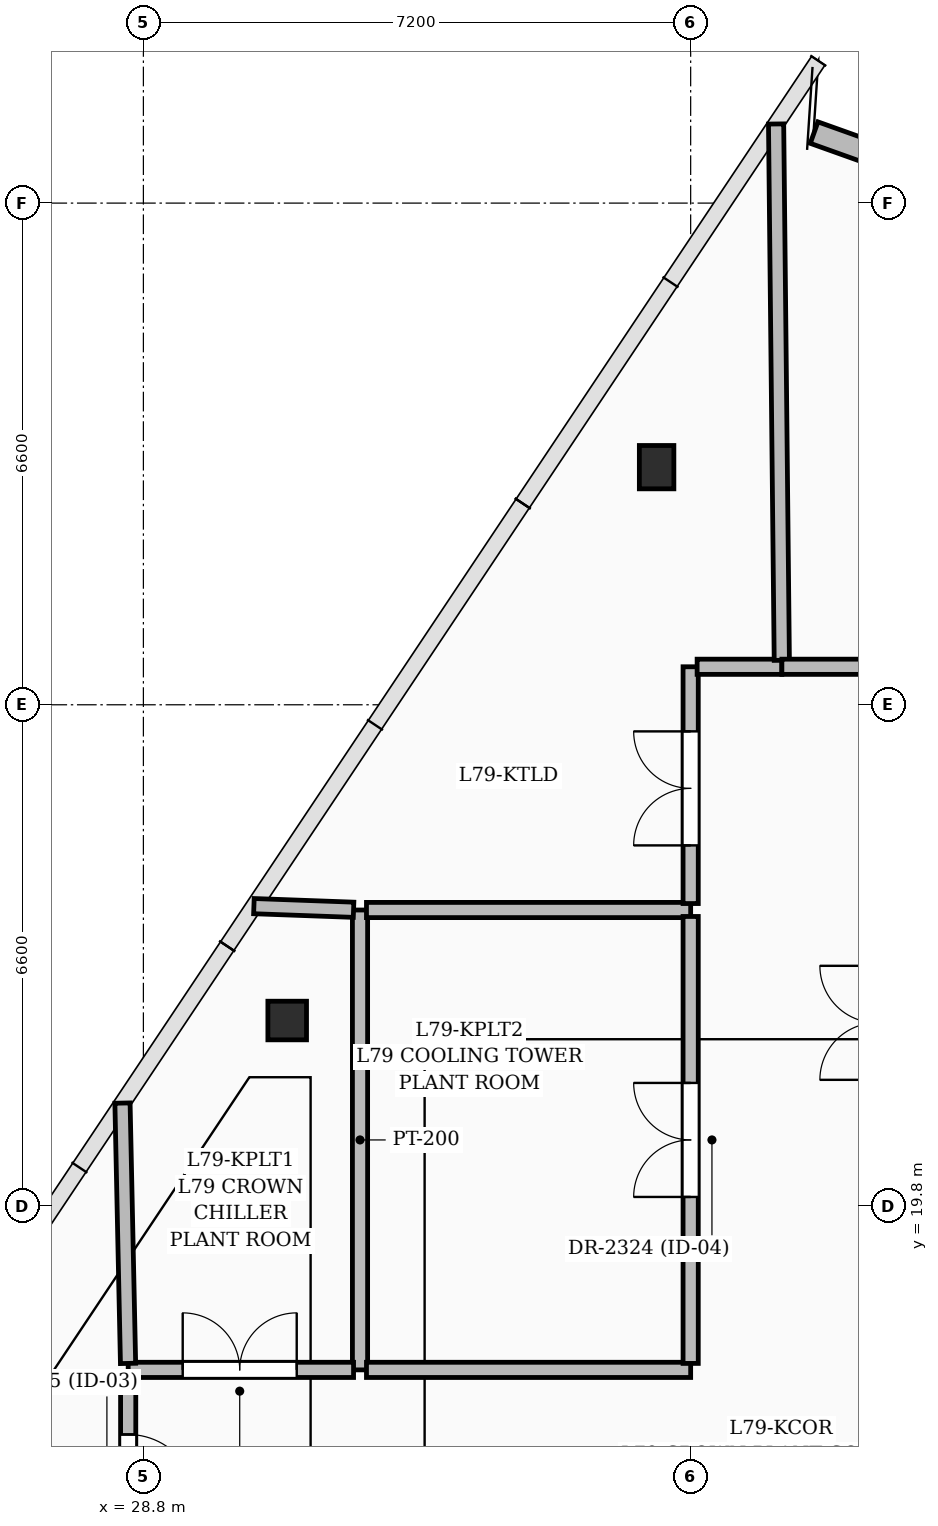
"""IFC4 building model, lengths in metres.
Left out: names, types, materials, properties, quantities, classifications, styles, units other than length and angle.
Written with IfcOpenShell. Run it as: python <this file> out.ifc"""

import sys

from ifc_helpers import new_model, si_unit, direction, frame, frame_2d, origin, origin_2d, place, context, subcontext, project, spatial, rectangle, hollow_circle, i_section, extrude, element, fill, save


model = new_model("IFC4")
c1 = context("Model", 3, precision=1e-05, world=origin(), true_north=direction((0.0, 1.0)))
c2 = subcontext(c1, "Body", "Model", "MODEL_VIEW")
j1 = project(units=[si_unit("LENGTHUNIT", "METRE"), si_unit("PLANEANGLEUNIT", "RADIAN")], contexts=[c1])
p1 = place(None, origin())
s1 = spatial("IfcSite", under=j1, at=p1, CompositionType="ELEMENT")
p2 = place(p1, origin())
s2 = spatial("IfcBuilding", under=s1, at=p2, CompositionType="ELEMENT")
p3 = place(p2, frame((0.0, 0.0, 306.5)))
s3 = spatial("IfcBuildingStorey", under=s2, at=p3, CompositionType="ELEMENT", Elevation=306.5)
p4 = place(p3, frame((35.552, 29.526, 0.0), z_axis=(0.0, 0.0, 1.0), x_axis=(1.0, 0.0, 0.0)))
e1 = element("IfcColumn", 1, at=p4, inside=s3, PredefinedType="COLUMN", context=c2, shape_type="SweptSolid", body=[
    extrude(i_section(OverallWidth=0.454, OverallDepth=0.57, WebThickness=0.078, FlangeThickness=0.094, FilletRadius=0.02, at=origin_2d()), origin(), (0.0, 0.0, 1.0), 4.0),
])
p5 = place(p3, frame((30.692, 22.246, 0.0), z_axis=(0.0, 0.0, 1.0), x_axis=(1.0, 0.0, 0.0)))
e2 = element("IfcColumn", 2, at=p5, inside=s3, PredefinedType="COLUMN", context=c2, shape_type="SweptSolid", body=[
    extrude(hollow_circle(Radius=0.254, WallThickness=0.016, at=origin_2d()), origin(), (0.0, 0.0, 1.0), 4.0),
])
p6 = place(p3, frame((37.624, 33.927, 0.0), z_axis=(0.0, 0.0, 1.0), x_axis=(0.941672407687, -0.336530944493, 0.0)))
e3 = element("IfcWall", 3, at=p6, inside=s3, PredefinedType="SOLIDWALL", context=c2, shape_type="SweptSolid", body=[
    extrude(rectangle(XDim=2.067, YDim=0.3, at=frame_2d((1.033, 0.0))), origin(), (0.0, 0.0, 1.0), 3.7),
])
p7 = place(p3, frame((31.65, 17.65, 0.0), z_axis=(0.0, 0.0, 1.0), x_axis=(0.0, 1.0, 0.0)))
e4 = element("IfcWall", 4, at=p7, inside=s3, PredefinedType="PARTITIONING", context=c2, shape_type="SweptSolid", body=[
    extrude(rectangle(XDim=6.05, YDim=0.2, at=frame_2d((3.025, 0.0))), origin(), (0.0, 0.0, 1.0), 2.977),
])
p8 = place(p3, frame((31.565, 23.703, 0.0), z_axis=(0.0, 0.0, 1.0), x_axis=(-0.999334821277, 0.036467999436, 0.0)))
e5 = element("IfcWall", 5, at=p8, inside=s3, PredefinedType="PARTITIONING", context=c2, shape_type="SweptSolid", body=[
    extrude(rectangle(XDim=1.312, YDim=0.2, at=frame_2d((0.656, 0.0))), origin(), (0.0, 0.0, 1.0), 2.977),
])
p9 = place(p3, frame((28.6, 17.65, 0.0), z_axis=(0.0, 0.0, 1.0), x_axis=(1.0, 0.0, 0.0)))
e6 = element("IfcWall", 6, at=p9, inside=s3, PredefinedType="PARTITIONING", context=c2, shape_type="SweptSolid", body=[
    extrude(rectangle(XDim=2.965, YDim=0.2, at=frame_2d((1.482, 0.0))), origin(), (0.0, 0.0, 1.0), 3.035),
])
p10 = place(p9, frame((0.717, 0.0, 0.0)))
e7 = element("IfcOpeningElement", 7, at=p10, cuts=e6, PredefinedType="OPENING", context=c2, shape_type="SweptSolid", body=[
    extrude(rectangle(XDim=1.5, YDim=2.2, at=frame_2d((0.75, 1.1))), frame((0.0, 0.11, 0.0), z_axis=(0.0, -1.0, 0.0), x_axis=(1.0, 0.0, 0.0)), (0.0, 0.0, 1.0), 0.22),
])
p11 = place(p3, frame((28.525, 21.16, 0.0), z_axis=(0.0, 0.0, 1.0), x_axis=(0.021380911082, -0.999771402192, 0.0)))
e8 = element("IfcWall", 8, at=p11, inside=s3, PredefinedType="PARTITIONING", context=c2, shape_type="SweptSolid", body=[
    extrude(rectangle(XDim=3.426, YDim=0.2, at=frame_2d((1.713, 0.0))), origin(), (0.0, 0.0, 1.0), 2.977),
])
p12 = place(p3, frame((36.0, 23.7, 0.0), z_axis=(0.0, 0.0, 1.0), x_axis=(-1.0, 0.0, 0.0)))
e9 = element("IfcWall", 9, at=p12, inside=s3, PredefinedType="PARTITIONING", context=c2, shape_type="SweptSolid", body=[
    extrude(rectangle(XDim=4.265, YDim=0.2, at=frame_2d((2.132, 0.0))), origin(), (0.0, 0.0, 1.0), 2.977),
])
p13 = place(p3, frame((31.735, 17.65, 0.0), z_axis=(0.0, 0.0, 1.0), x_axis=(1.0, 0.0, 0.0)))
e10 = element("IfcWall", 10, at=p13, inside=s3, PredefinedType="PARTITIONING", context=c2, shape_type="SweptSolid", body=[
    extrude(rectangle(XDim=4.265, YDim=0.2, at=frame_2d((2.132, 0.0))), origin(), (0.0, 0.0, 1.0), 3.035),
])
p14 = place(p3, frame((36.0, 17.735, 0.0), z_axis=(0.0, 0.0, 1.0), x_axis=(0.0, 1.0, 0.0)))
e11 = element("IfcWall", 11, at=p14, inside=s3, PredefinedType="PARTITIONING", context=c2, shape_type="SweptSolid", body=[
    extrude(rectangle(XDim=5.88, YDim=0.2, at=frame_2d((2.94, 0.0))), origin(), (0.0, 0.0, 1.0), 3.137),
])
p15 = place(p14, frame((2.19, 0.0, 0.0)))
e12 = element("IfcOpeningElement", 12, at=p15, cuts=e11, PredefinedType="OPENING", context=c2, shape_type="SweptSolid", body=[
    extrude(rectangle(XDim=1.5, YDim=2.2, at=frame_2d((0.75, 1.1))), frame((0.0, 0.11, 0.0), z_axis=(0.0, -1.0, 0.0), x_axis=(1.0, 0.0, 0.0)), (0.0, 0.0, 1.0), 0.22),
])
p16 = place(p3, frame((36.0, 23.785, 0.0), z_axis=(0.0, 0.0, 1.0), x_axis=(0.0, 1.0, 0.0)))
e13 = element("IfcWall", 13, at=p16, inside=s3, PredefinedType="PARTITIONING", context=c2, shape_type="SweptSolid", body=[
    extrude(rectangle(XDim=3.115, YDim=0.2, at=frame_2d((1.558, 0.0))), origin(), (0.0, 0.0, 1.0), 3.137),
])
p17 = place(p16, frame((0.765, 0.0, 0.0)))
e14 = element("IfcOpeningElement", 14, at=p17, cuts=e13, PredefinedType="OPENING", context=c2, shape_type="SweptSolid", body=[
    extrude(rectangle(XDim=1.5, YDim=2.2, at=frame_2d((0.75, 1.1))), frame((0.0, 0.11, 0.0), z_axis=(0.0, -1.0, 0.0), x_axis=(1.0, 0.0, 0.0)), (0.0, 0.0, 1.0), 0.22),
])
p18 = place(p3, frame((36.085, 26.9, 0.0), z_axis=(0.0, 0.0, 1.0), x_axis=(1.0, 0.0, 0.0)))
e15 = element("IfcWall", 15, at=p18, inside=s3, PredefinedType="PARTITIONING", context=c2, shape_type="SweptSolid", body=[
    extrude(rectangle(XDim=1.115, YDim=0.2, at=frame_2d((0.558, 0.0))), origin(), (0.0, 0.0, 1.0), 3.7),
])
p19 = place(p3, frame((37.199, 26.985, 0.0), z_axis=(0.0, 0.0, 1.0), x_axis=(-0.010656465563, 0.999943218259, 0.0)))
e16 = element("IfcWall", 16, at=p19, inside=s3, PredefinedType="PARTITIONING", context=c2, shape_type="SweptSolid", body=[
    extrude(rectangle(XDim=7.056, YDim=0.2, at=frame_2d((3.528, 0.0))), origin(), (0.0, 0.0, 1.0), 2.977),
])
p20 = place(p3, frame((28.6, 17.565, 0.0), z_axis=(0.0, 0.0, 1.0), x_axis=(0.0, -1.0, 0.0)))
e17 = element("IfcWall", 17, at=p20, inside=s3, PredefinedType="PARTITIONING", context=c2, shape_type="SweptSolid", body=[
    extrude(rectangle(XDim=2.515, YDim=0.2, at=frame_2d((1.257, 0.0))), origin(), (0.0, 0.0, 1.0), 3.035),
])
p21 = place(p20, frame((0.765, 0.0, 0.0)))
e18 = element("IfcOpeningElement", 18, at=p21, cuts=e17, PredefinedType="OPENING", context=c2, shape_type="SweptSolid", body=[
    extrude(rectangle(XDim=0.9, YDim=2.1, at=frame_2d((0.45, 1.05))), frame((0.0, 0.11, 0.0), z_axis=(0.0, -1.0, 0.0), x_axis=(1.0, 0.0, 0.0)), (0.0, 0.0, 1.0), 0.22),
])
p22 = place(p3, frame((38.365, 26.9, 0.0), z_axis=(0.0, 0.0, 1.0), x_axis=(-1.0, 0.0, 0.0)))
e19 = element("IfcWall", 19, at=p22, inside=s3, PredefinedType="PARTITIONING", context=c2, shape_type="SweptSolid", body=[
    extrude(rectangle(XDim=1.165, YDim=0.2, at=frame_2d((0.583, 0.0))), origin(), (0.0, 0.0, 1.0), 3.7),
])
p23 = place(p10, origin())
e20 = element("IfcDoor", 20, at=p23, inside=s3, OperationType="DOUBLE_DOOR_SINGLE_SWING", PredefinedType="DOOR", context=c2, shape_type="SweptSolid", body=[
    extrude(rectangle(XDim=1.5, YDim=2.2, at=frame_2d((0.75, 1.1))), frame((0.0, 0.025, 0.0), z_axis=(0.0, -1.0, 0.0), x_axis=(1.0, 0.0, 0.0)), (0.0, 0.0, 1.0), 0.05),
])
fill(e7, e20)
p24 = place(p15, origin())
e21 = element("IfcDoor", 21, at=p24, inside=s3, OperationType="DOUBLE_DOOR_SINGLE_SWING", PredefinedType="DOOR", context=c2, shape_type="SweptSolid", body=[
    extrude(rectangle(XDim=1.5, YDim=2.2, at=frame_2d((0.75, 1.1))), frame((0.0, 0.025, 0.0), z_axis=(0.0, -1.0, 0.0), x_axis=(1.0, 0.0, 0.0)), (0.0, 0.0, 1.0), 0.05),
])
fill(e12, e21)
p25 = place(p21, origin())
e22 = element("IfcDoor", 22, at=p25, inside=s3, OperationType="SINGLE_SWING_RIGHT", PredefinedType="DOOR", context=c2, shape_type="SweptSolid", body=[
    extrude(rectangle(XDim=0.9, YDim=2.1, at=frame_2d((0.45, 1.05))), frame((0.0, 0.025, 0.0), z_axis=(0.0, -1.0, 0.0), x_axis=(1.0, 0.0, 0.0)), (0.0, 0.0, 1.0), 0.05),
])
fill(e18, e22)
p26 = place(p17, origin())
e23 = element("IfcDoor", 23, at=p26, inside=s3, OperationType="DOUBLE_DOOR_SINGLE_SWING", PredefinedType="DOOR", context=c2, shape_type="SweptSolid", body=[
    extrude(rectangle(XDim=1.5, YDim=2.2, at=frame_2d((0.75, 1.1))), frame((0.0, 0.025, 0.0), z_axis=(0.0, -1.0, 0.0), x_axis=(1.0, 0.0, 0.0)), (0.0, 0.0, 1.0), 0.05),
])
fill(e14, e23)
save(model, sys.argv[1])
